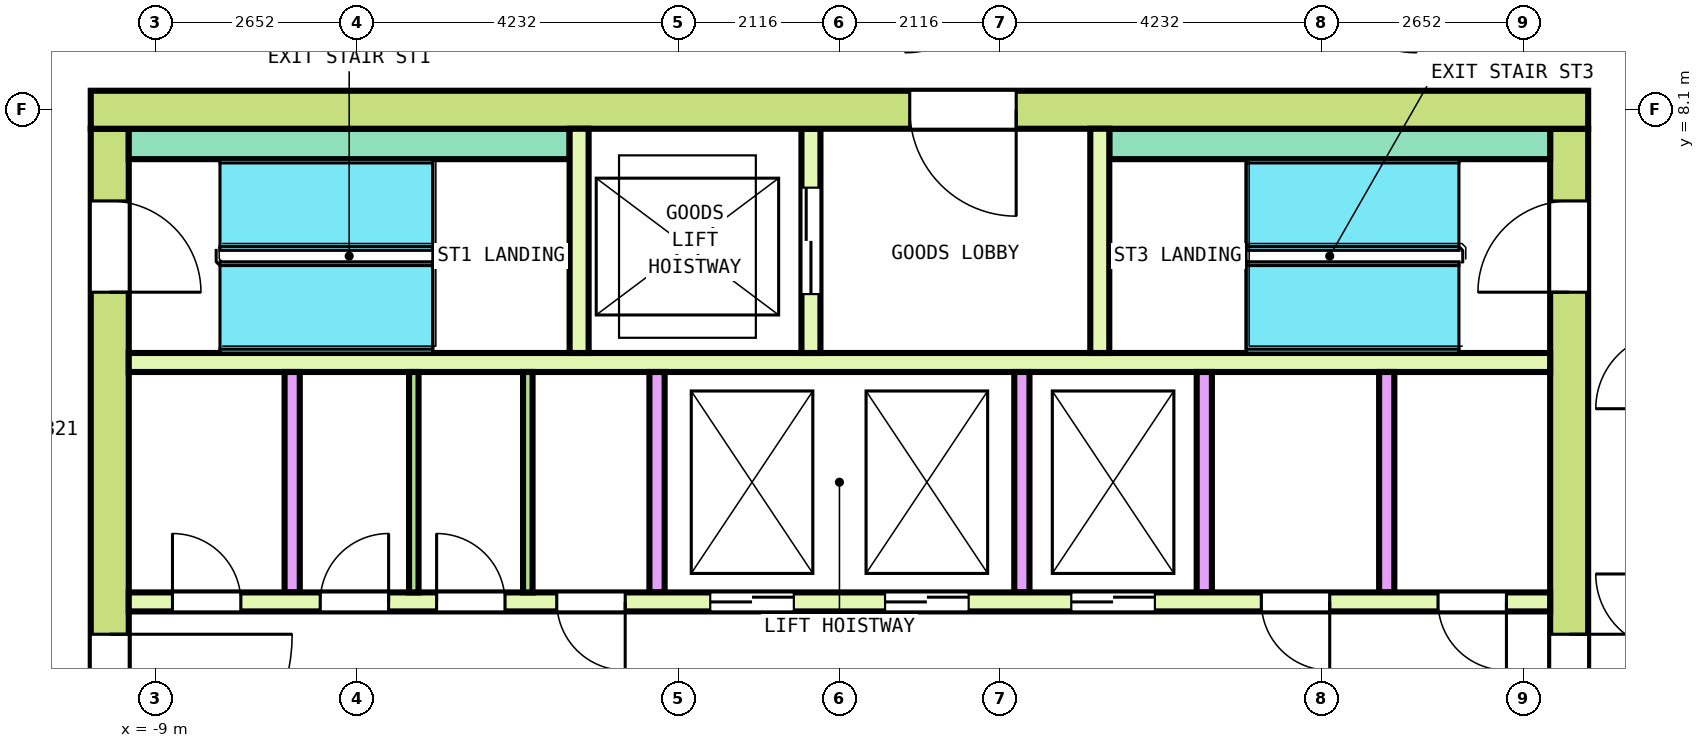
"""IFC4 building model, lengths in metres.
Left out: names, types, materials, properties, quantities, classifications, styles, units other than length and angle.
Written with IfcOpenShell. Run it as: python <this file> out.ifc"""

import sys

from ifc_helpers import new_model, si_unit, direction, frame, frame_2d, origin, place, context, subcontext, project, spatial, rectangle, extrude, element, fill, save


model = new_model("IFC4")
c1 = context("Model", 3, precision=1e-05, world=origin(), true_north=direction((0.0, 1.0)))
c2 = subcontext(c1, "Body", "Model", "MODEL_VIEW")
j1 = project(units=[si_unit("LENGTHUNIT", "METRE"), si_unit("PLANEANGLEUNIT", "RADIAN")], contexts=[c1])
p1 = place(None, origin())
s1 = spatial("IfcSite", under=j1, at=p1, CompositionType="ELEMENT")
p2 = place(p1, origin())
s2 = spatial("IfcBuilding", under=s1, at=p2, CompositionType="ELEMENT")
p3 = place(p2, frame((0.0, 0.0, 316.6)))
s3 = spatial("IfcBuildingStorey", under=s2, at=p3, CompositionType="ELEMENT", Elevation=316.6)
p4 = place(p3, frame((-9.85, 8.1, 0.0), z_axis=(0.0, 0.0, 1.0), x_axis=(1.0, 0.0, 0.0)))
e1 = element("IfcWall", 1, at=p4, inside=s3, PredefinedType="SHEAR", context=c2, shape_type="SweptSolid", body=[
    extrude(rectangle(XDim=19.7, YDim=0.5, at=frame_2d((9.85, 0.0))), origin(), (0.0, 0.0, 1.0), 3.7),
])
p5 = place(p4, frame((10.775, 0.0, 0.0)))
e2 = element("IfcOpeningElement", 2, at=p5, cuts=e1, PredefinedType="OPENING", context=c2, shape_type="SweptSolid", body=[
    extrude(rectangle(XDim=1.4, YDim=2.1, at=frame_2d((0.7, 1.05))), frame((0.0, 0.26, 0.0), z_axis=(0.0, -1.0, 0.0), x_axis=(1.0, 0.0, 0.0)), (0.0, 0.0, 1.0), 0.52),
])
p6 = place(p3, frame((-9.6, -7.85, 0.0), z_axis=(0.0, 0.0, 1.0), x_axis=(0.0, 1.0, 0.0)))
e3 = element("IfcWall", 3, at=p6, inside=s3, PredefinedType="SHEAR", context=c2, shape_type="SweptSolid", body=[
    extrude(rectangle(XDim=15.7, YDim=0.5, at=frame_2d((7.85, 0.0))), origin(), (0.0, 0.0, 1.0), 3.7),
])
p7 = place(p6, frame((6.65, 0.0, 0.0)))
e4 = element("IfcOpeningElement", 4, at=p7, cuts=e3, PredefinedType="OPENING", context=c2, shape_type="SweptSolid", body=[
    extrude(rectangle(XDim=2.4, YDim=2.1, at=frame_2d((1.2, 1.05))), frame((0.0, 0.26, 0.0), z_axis=(0.0, -1.0, 0.0), x_axis=(1.0, 0.0, 0.0)), (0.0, 0.0, 1.0), 0.52),
])
p8 = place(p6, frame((13.55, 0.0, 0.0)))
e5 = element("IfcOpeningElement", 5, at=p8, cuts=e3, PredefinedType="OPENING", context=c2, shape_type="SweptSolid", body=[
    extrude(rectangle(XDim=1.2, YDim=2.1, at=frame_2d((0.6, 1.05))), frame((0.0, 0.26, 0.0), z_axis=(0.0, -1.0, 0.0), x_axis=(1.0, 0.0, 0.0)), (0.0, 0.0, 1.0), 0.52),
])
p9 = place(p6, frame((0.95, 0.0, 0.0)))
e6 = element("IfcOpeningElement", 6, at=p9, cuts=e3, PredefinedType="OPENING", context=c2, shape_type="SweptSolid", body=[
    extrude(rectangle(XDim=1.2, YDim=2.1, at=frame_2d((0.6, 1.05))), frame((0.0, 0.26, 0.0), z_axis=(0.0, -1.0, 0.0), x_axis=(1.0, 0.0, 0.0)), (0.0, 0.0, 1.0), 0.52),
])
p10 = place(p3, frame((9.6, -7.85, 0.0), z_axis=(0.0, 0.0, 1.0), x_axis=(0.0, 1.0, 0.0)))
e7 = element("IfcWall", 7, at=p10, inside=s3, PredefinedType="SHEAR", context=c2, shape_type="SweptSolid", body=[
    extrude(rectangle(XDim=15.7, YDim=0.5, at=frame_2d((7.85, 0.0))), origin(), (0.0, 0.0, 1.0), 3.7),
])
p11 = place(p10, frame((6.65, 0.0, 0.0)))
e8 = element("IfcOpeningElement", 8, at=p11, cuts=e7, PredefinedType="OPENING", context=c2, shape_type="SweptSolid", body=[
    extrude(rectangle(XDim=2.4, YDim=2.1, at=frame_2d((1.2, 1.05))), frame((0.0, 0.26, 0.0), z_axis=(0.0, -1.0, 0.0), x_axis=(1.0, 0.0, 0.0)), (0.0, 0.0, 1.0), 0.52),
])
p12 = place(p10, frame((13.55, 0.0, 0.0)))
e9 = element("IfcOpeningElement", 9, at=p12, cuts=e7, PredefinedType="OPENING", context=c2, shape_type="SweptSolid", body=[
    extrude(rectangle(XDim=1.2, YDim=2.1, at=frame_2d((0.6, 1.05))), frame((0.0, 0.26, 0.0), z_axis=(0.0, -1.0, 0.0), x_axis=(1.0, 0.0, 0.0)), (0.0, 0.0, 1.0), 0.52),
])
p13 = place(p10, frame((1.05, 0.0, 0.0)))
e10 = element("IfcOpeningElement", 10, at=p13, cuts=e7, PredefinedType="OPENING", context=c2, shape_type="SweptSolid", body=[
    extrude(rectangle(XDim=1.0, YDim=2.1, at=frame_2d((0.5, 1.05))), frame((0.0, 0.26, 0.0), z_axis=(0.0, -1.0, 0.0), x_axis=(1.0, 0.0, 0.0)), (0.0, 0.0, 1.0), 0.52),
])
p14 = place(p3, frame((-9.35, 1.625, 0.0), z_axis=(0.0, 0.0, 1.0), x_axis=(1.0, 0.0, 0.0)))
e11 = element("IfcWall", 11, at=p14, inside=s3, PredefinedType="SOLIDWALL", context=c2, shape_type="SweptSolid", body=[
    extrude(rectangle(XDim=18.7, YDim=0.25, at=frame_2d((9.35, 0.0))), origin(), (0.0, 0.0, 1.0), 3.7),
])
p15 = place(p14, frame((7.65, 0.0, 0.0)))
e12 = element("IfcOpeningElement", 12, at=p15, cuts=e11, PredefinedType="OPENING", context=c2, shape_type="SweptSolid", body=[
    extrude(rectangle(XDim=1.1, YDim=2.1, at=frame_2d((0.55, 1.05))), frame((0.0, 0.135, 0.0), z_axis=(0.0, -1.0, 0.0), x_axis=(1.0, 0.0, 0.0)), (0.0, 0.0, 1.0), 0.27),
])
p16 = place(p14, frame((9.95, 0.0, 0.0)))
e13 = element("IfcOpeningElement", 13, at=p16, cuts=e11, PredefinedType="OPENING", context=c2, shape_type="SweptSolid", body=[
    extrude(rectangle(XDim=1.1, YDim=2.1, at=frame_2d((0.55, 1.05))), frame((0.0, 0.135, 0.0), z_axis=(0.0, -1.0, 0.0), x_axis=(1.0, 0.0, 0.0)), (0.0, 0.0, 1.0), 0.27),
])
p17 = place(p14, frame((12.4, 0.0, 0.0)))
e14 = element("IfcOpeningElement", 14, at=p17, cuts=e11, PredefinedType="OPENING", context=c2, shape_type="SweptSolid", body=[
    extrude(rectangle(XDim=1.1, YDim=2.1, at=frame_2d((0.55, 1.05))), frame((0.0, 0.135, 0.0), z_axis=(0.0, -1.0, 0.0), x_axis=(1.0, 0.0, 0.0)), (0.0, 0.0, 1.0), 0.27),
])
p18 = place(p14, frame((0.575, 0.0, 0.0)))
e15 = element("IfcOpeningElement", 15, at=p18, cuts=e11, PredefinedType="OPENING", context=c2, shape_type="SweptSolid", body=[
    extrude(rectangle(XDim=0.9, YDim=2.1, at=frame_2d((0.45, 1.05))), frame((0.0, 0.135, 0.0), z_axis=(0.0, -1.0, 0.0), x_axis=(1.0, 0.0, 0.0)), (0.0, 0.0, 1.0), 0.27),
])
p19 = place(p14, frame((2.519, 0.0, 0.0)))
e16 = element("IfcOpeningElement", 16, at=p19, cuts=e11, PredefinedType="OPENING", context=c2, shape_type="SweptSolid", body=[
    extrude(rectangle(XDim=0.9, YDim=2.1, at=frame_2d((0.45, 1.05))), frame((0.0, 0.135, 0.0), z_axis=(0.0, -1.0, 0.0), x_axis=(1.0, 0.0, 0.0)), (0.0, 0.0, 1.0), 0.27),
])
p20 = place(p14, frame((4.05, 0.0, 0.0)))
e17 = element("IfcOpeningElement", 17, at=p20, cuts=e11, PredefinedType="OPENING", context=c2, shape_type="SweptSolid", body=[
    extrude(rectangle(XDim=0.9, YDim=2.1, at=frame_2d((0.45, 1.05))), frame((0.0, 0.135, 0.0), z_axis=(0.0, -1.0, 0.0), x_axis=(1.0, 0.0, 0.0)), (0.0, 0.0, 1.0), 0.27),
])
p21 = place(p14, frame((5.631, 0.0, 0.0)))
e18 = element("IfcOpeningElement", 18, at=p21, cuts=e11, PredefinedType="OPENING", context=c2, shape_type="SweptSolid", body=[
    extrude(rectangle(XDim=0.9, YDim=2.1, at=frame_2d((0.45, 1.05))), frame((0.0, 0.135, 0.0), z_axis=(0.0, -1.0, 0.0), x_axis=(1.0, 0.0, 0.0)), (0.0, 0.0, 1.0), 0.27),
])
p22 = place(p14, frame((14.9, 0.0, 0.0)))
e19 = element("IfcOpeningElement", 19, at=p22, cuts=e11, PredefinedType="OPENING", context=c2, shape_type="SweptSolid", body=[
    extrude(rectangle(XDim=0.9, YDim=2.1, at=frame_2d((0.45, 1.05))), frame((0.0, 0.135, 0.0), z_axis=(0.0, -1.0, 0.0), x_axis=(1.0, 0.0, 0.0)), (0.0, 0.0, 1.0), 0.27),
])
p23 = place(p14, frame((17.225, 0.0, 0.0)))
e20 = element("IfcOpeningElement", 20, at=p23, cuts=e11, PredefinedType="OPENING", context=c2, shape_type="SweptSolid", body=[
    extrude(rectangle(XDim=0.9, YDim=2.1, at=frame_2d((0.45, 1.05))), frame((0.0, 0.135, 0.0), z_axis=(0.0, -1.0, 0.0), x_axis=(1.0, 0.0, 0.0)), (0.0, 0.0, 1.0), 0.27),
])
p24 = place(p3, frame((-9.35, 4.775, 0.0), z_axis=(0.0, 0.0, 1.0), x_axis=(1.0, 0.0, 0.0)))
e21 = element("IfcWall", 21, at=p24, inside=s3, PredefinedType="SOLIDWALL", context=c2, shape_type="SweptSolid", body=[
    extrude(rectangle(XDim=18.7, YDim=0.25, at=frame_2d((9.35, 0.0))), origin(), (0.0, 0.0, 1.0), 3.7),
])
for number, where, z_axis, x_axis in (
    (22, (-7.2, 1.75, 0.0), (0.0, 0.0, 1.0), (0.0, 1.0, 0.0)),
    (23, (-2.4, 1.75, 0.0), (0.0, 0.0, 1.0), (0.0, 1.0, 0.0)),
    (24, (2.4, 1.75, 0.0), (0.0, 0.0, 1.0), (0.0, 1.0, 0.0)),
    (25, (4.8, 1.75, 0.0), (0.0, 0.0, 1.0), (0.0, 1.0, 0.0)),
    (26, (7.2, 1.75, 0.0), (0.0, 0.0, 1.0), (0.0, 1.0, 0.0)),
):
    element("IfcWall", number, at=place(p3, frame(where, z_axis=z_axis, x_axis=x_axis)), inside=s3, PredefinedType="SOLIDWALL", context=c2, shape_type="SweptSolid", body=[
        extrude(rectangle(XDim=2.9, YDim=0.2, at=frame_2d((1.45, 0.0))), origin(), (0.0, 0.0, 1.0), 3.7),
    ])
for number, where, z_axis, x_axis in (
    (27, (-9.35, 7.65, 0.0), (0.0, 0.0, 1.0), (1.0, 0.0, 0.0)),
    (28, (3.55, 7.65, 0.0), (0.0, 0.0, 1.0), (1.0, 0.0, 0.0)),
):
    element("IfcWall", number, at=place(p3, frame(where, z_axis=z_axis, x_axis=x_axis)), inside=s3, PredefinedType="SOLIDWALL", context=c2, shape_type="SweptSolid", body=[
        extrude(rectangle(XDim=5.8, YDim=0.4, at=frame_2d((2.9, 0.0))), origin(), (0.0, 0.0, 1.0), 3.7),
    ])
p25 = place(p3, frame((-3.425, 4.9, 0.0), z_axis=(0.0, 0.0, 1.0), x_axis=(0.0, 1.0, 0.0)))
e29 = element("IfcWall", 29, at=p25, inside=s3, PredefinedType="SOLIDWALL", context=c2, shape_type="SweptSolid", body=[
    extrude(rectangle(XDim=2.95, YDim=0.25, at=frame_2d((1.475, 0.0))), origin(), (0.0, 0.0, 1.0), 3.7),
])
p26 = place(p3, frame((-0.375, 4.9, 0.0), z_axis=(0.0, 0.0, 1.0), x_axis=(0.0, 1.0, 0.0)))
e30 = element("IfcWall", 30, at=p26, inside=s3, PredefinedType="SOLIDWALL", context=c2, shape_type="SweptSolid", body=[
    extrude(rectangle(XDim=2.95, YDim=0.25, at=frame_2d((1.475, 0.0))), origin(), (0.0, 0.0, 1.0), 3.7),
])
p27 = place(p26, frame((0.775, 0.0, 0.0)))
e31 = element("IfcOpeningElement", 31, at=p27, cuts=e30, PredefinedType="OPENING", context=c2, shape_type="SweptSolid", body=[
    extrude(rectangle(XDim=1.4, YDim=2.1, at=frame_2d((0.7, 1.05))), frame((0.0, 0.135, 0.0), z_axis=(0.0, -1.0, 0.0), x_axis=(1.0, 0.0, 0.0)), (0.0, 0.0, 1.0), 0.27),
])
p28 = place(p3, frame((3.425, 4.9, 0.0), z_axis=(0.0, 0.0, 1.0), x_axis=(0.0, 1.0, 0.0)))
e32 = element("IfcWall", 32, at=p28, inside=s3, PredefinedType="SOLIDWALL", context=c2, shape_type="SweptSolid", body=[
    extrude(rectangle(XDim=2.95, YDim=0.25, at=frame_2d((1.475, 0.0))), origin(), (0.0, 0.0, 1.0), 3.7),
])
for number, where, z_axis, x_axis in (
    (33, (-5.6, 1.75, 0.0), (0.0, 0.0, 1.0), (0.0, 1.0, 0.0)),
    (34, (-4.1, 1.75, 0.0), (0.0, 0.0, 1.0), (0.0, 1.0, 0.0)),
):
    element("IfcWall", number, at=place(p3, frame(where, z_axis=z_axis, x_axis=x_axis)), inside=s3, PredefinedType="PARTITIONING", context=c2, shape_type="SweptSolid", body=[
        extrude(rectangle(XDim=2.9, YDim=0.125, at=frame_2d((1.45, 0.0))), origin(), (0.0, 0.0, 1.0), 3.7),
    ])
p29 = place(p15, origin())
e35 = element("IfcDoor", 35, at=p29, inside=s3, OperationType="DOUBLE_DOOR_SLIDING", PredefinedType="DOOR", context=c2, shape_type="SweptSolid", body=[
    extrude(rectangle(XDim=1.1, YDim=2.1, at=frame_2d((0.55, 1.05))), frame((0.0, 0.075, 0.0), z_axis=(0.0, -1.0, 0.0), x_axis=(1.0, 0.0, 0.0)), (0.0, 0.0, 1.0), 0.15),
])
fill(e12, e35)
p30 = place(p16, origin())
e36 = element("IfcDoor", 36, at=p30, inside=s3, OperationType="DOUBLE_DOOR_SLIDING", PredefinedType="DOOR", context=c2, shape_type="SweptSolid", body=[
    extrude(rectangle(XDim=1.1, YDim=2.1, at=frame_2d((0.55, 1.05))), frame((0.0, 0.075, 0.0), z_axis=(0.0, -1.0, 0.0), x_axis=(1.0, 0.0, 0.0)), (0.0, 0.0, 1.0), 0.15),
])
fill(e13, e36)
p31 = place(p17, origin())
e37 = element("IfcDoor", 37, at=p31, inside=s3, OperationType="DOUBLE_DOOR_SLIDING", PredefinedType="DOOR", context=c2, shape_type="SweptSolid", body=[
    extrude(rectangle(XDim=1.1, YDim=2.1, at=frame_2d((0.55, 1.05))), frame((0.0, 0.075, 0.0), z_axis=(0.0, -1.0, 0.0), x_axis=(1.0, 0.0, 0.0)), (0.0, 0.0, 1.0), 0.15),
])
fill(e14, e37)
p32 = place(p27, origin())
e38 = element("IfcDoor", 38, at=p32, inside=s3, OperationType="DOUBLE_DOOR_SLIDING", PredefinedType="DOOR", context=c2, shape_type="SweptSolid", body=[
    extrude(rectangle(XDim=1.4, YDim=2.1, at=frame_2d((0.7, 1.05))), frame((0.0, 0.075, 0.0), z_axis=(0.0, -1.0, 0.0), x_axis=(1.0, 0.0, 0.0)), (0.0, 0.0, 1.0), 0.15),
])
fill(e31, e38)
p33 = place(p7, origin())
e39 = element("IfcDoor", 39, at=p33, inside=s3, OperationType="DOUBLE_DOOR_SINGLE_SWING", PredefinedType="DOOR", context=c2, shape_type="SweptSolid", body=[
    extrude(rectangle(XDim=2.4, YDim=2.1, at=frame_2d((1.2, 1.05))), frame((0.0, 0.2, 0.0), z_axis=(0.0, -1.0, 0.0), x_axis=(1.0, 0.0, 0.0)), (0.0, 0.0, 1.0), 0.4),
])
fill(e4, e39)
p34 = place(p11, origin())
e40 = element("IfcDoor", 40, at=p34, inside=s3, OperationType="DOUBLE_DOOR_SINGLE_SWING", PredefinedType="DOOR", context=c2, shape_type="SweptSolid", body=[
    extrude(rectangle(XDim=2.4, YDim=2.1, at=frame_2d((1.2, 1.05))), frame((0.0, 0.2, 0.0), z_axis=(0.0, -1.0, 0.0), x_axis=(1.0, 0.0, 0.0)), (0.0, 0.0, 1.0), 0.4),
])
fill(e8, e40)
p35 = place(p8, origin())
e41 = element("IfcDoor", 41, at=p35, inside=s3, OperationType="SINGLE_SWING_LEFT", PredefinedType="DOOR", context=c2, shape_type="SweptSolid", body=[
    extrude(rectangle(XDim=1.2, YDim=2.1, at=frame_2d((0.6, 1.05))), frame((0.0, 0.2, 0.0), z_axis=(0.0, -1.0, 0.0), x_axis=(1.0, 0.0, 0.0)), (0.0, 0.0, 1.0), 0.4),
])
fill(e5, e41)
p36 = place(p12, origin())
e42 = element("IfcDoor", 42, at=p36, inside=s3, OperationType="SINGLE_SWING_LEFT", PredefinedType="DOOR", context=c2, shape_type="SweptSolid", body=[
    extrude(rectangle(XDim=1.2, YDim=2.1, at=frame_2d((0.6, 1.05))), frame((0.0, 0.2, 0.0), z_axis=(0.0, -1.0, 0.0), x_axis=(1.0, 0.0, 0.0)), (0.0, 0.0, 1.0), 0.4),
])
fill(e9, e42)
p37 = place(p5, origin())
e43 = element("IfcDoor", 43, at=p37, inside=s3, OperationType="DOUBLE_DOOR_SINGLE_SWING", PredefinedType="DOOR", context=c2, shape_type="SweptSolid", body=[
    extrude(rectangle(XDim=1.4, YDim=2.1, at=frame_2d((0.7, 1.05))), frame((0.0, 0.2, 0.0), z_axis=(0.0, -1.0, 0.0), x_axis=(1.0, 0.0, 0.0)), (0.0, 0.0, 1.0), 0.4),
])
fill(e2, e43)
p38 = place(p18, origin())
e44 = element("IfcDoor", 44, at=p38, inside=s3, OperationType="SINGLE_SWING_LEFT", PredefinedType="DOOR", context=c2, shape_type="SweptSolid", body=[
    extrude(rectangle(XDim=0.9, YDim=2.1, at=frame_2d((0.45, 1.05))), frame((0.0, 0.075, 0.0), z_axis=(0.0, -1.0, 0.0), x_axis=(1.0, 0.0, 0.0)), (0.0, 0.0, 1.0), 0.15),
])
fill(e15, e44)
p39 = place(p19, origin())
e45 = element("IfcDoor", 45, at=p39, inside=s3, OperationType="SINGLE_SWING_RIGHT", PredefinedType="DOOR", context=c2, shape_type="SweptSolid", body=[
    extrude(rectangle(XDim=0.9, YDim=2.1, at=frame_2d((0.45, 1.05))), frame((0.0, 0.075, 0.0), z_axis=(0.0, -1.0, 0.0), x_axis=(1.0, 0.0, 0.0)), (0.0, 0.0, 1.0), 0.15),
])
fill(e16, e45)
p40 = place(p20, origin())
e46 = element("IfcDoor", 46, at=p40, inside=s3, OperationType="SINGLE_SWING_LEFT", PredefinedType="DOOR", context=c2, shape_type="SweptSolid", body=[
    extrude(rectangle(XDim=0.9, YDim=2.1, at=frame_2d((0.45, 1.05))), frame((0.0, 0.075, 0.0), z_axis=(0.0, -1.0, 0.0), x_axis=(1.0, 0.0, 0.0)), (0.0, 0.0, 1.0), 0.15),
])
fill(e17, e46)
p41 = place(p21, origin())
e47 = element("IfcDoor", 47, at=p41, inside=s3, OperationType="SINGLE_SWING_RIGHT", PredefinedType="DOOR", context=c2, shape_type="SweptSolid", body=[
    extrude(rectangle(XDim=0.9, YDim=2.1, at=frame_2d((0.45, 1.05))), frame((0.0, 0.075, 0.0), z_axis=(0.0, -1.0, 0.0), x_axis=(1.0, 0.0, 0.0)), (0.0, 0.0, 1.0), 0.15),
])
fill(e18, e47)
p42 = place(p22, origin())
e48 = element("IfcDoor", 48, at=p42, inside=s3, OperationType="SINGLE_SWING_LEFT", PredefinedType="DOOR", context=c2, shape_type="SweptSolid", body=[
    extrude(rectangle(XDim=0.9, YDim=2.1, at=frame_2d((0.45, 1.05))), frame((0.0, 0.075, 0.0), z_axis=(0.0, -1.0, 0.0), x_axis=(1.0, 0.0, 0.0)), (0.0, 0.0, 1.0), 0.15),
])
fill(e19, e48)
p43 = place(p23, origin())
e49 = element("IfcDoor", 49, at=p43, inside=s3, OperationType="SINGLE_SWING_RIGHT", PredefinedType="DOOR", context=c2, shape_type="SweptSolid", body=[
    extrude(rectangle(XDim=0.9, YDim=2.1, at=frame_2d((0.45, 1.05))), frame((0.0, 0.075, 0.0), z_axis=(0.0, -1.0, 0.0), x_axis=(1.0, 0.0, 0.0)), (0.0, 0.0, 1.0), 0.15),
])
fill(e20, e49)
save(model, sys.argv[1])
